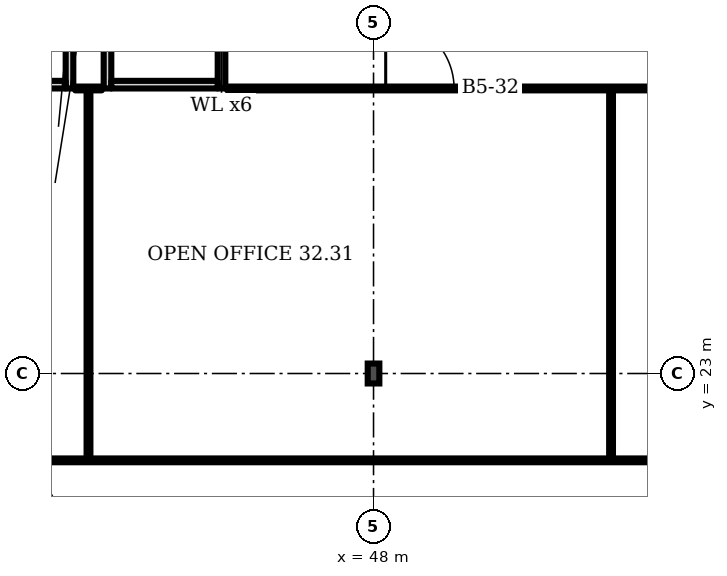
"""IFC4 building model, lengths in metres.
Left out: names, types, materials, properties, quantities, classifications, styles, units other than length and angle.
Written with IfcOpenShell. Run it as: python <this file> out.ifc"""

import sys

from ifc_helpers import new_model, si_unit, direction, frame, frame_2d, origin, origin_2d, place, context, subcontext, project, spatial, rectangle, i_section, extrude, element, fill, save


model = new_model("IFC4")
c1 = context("Model", 3, precision=1e-05, world=origin(), true_north=direction((0.0, 1.0)))
c2 = subcontext(c1, "Body", "Model", "MODEL_VIEW")
j1 = project(units=[si_unit("LENGTHUNIT", "METRE"), si_unit("PLANEANGLEUNIT", "RADIAN")], contexts=[c1])
p1 = place(None, origin())
s1 = spatial("IfcSite", under=j1, at=p1, CompositionType="ELEMENT")
p2 = place(p1, origin())
s2 = spatial("IfcBuilding", under=s1, at=p2, CompositionType="ELEMENT")
p3 = place(p2, frame((0.0, 0.0, 136.3)))
s3 = spatial("IfcBuildingStorey", under=s2, at=p3, CompositionType="ELEMENT", Elevation=136.3)
p4 = place(p3, frame((48.0, 23.0, 0.0), z_axis=(0.0, 0.0, 1.0), x_axis=(1.0, 0.0, 0.0)))
e1 = element("IfcColumn", 1, at=p4, inside=s3, PredefinedType="COLUMN", context=c2, shape_type="SweptSolid", body=[
    extrude(i_section(OverallWidth=0.306, OverallDepth=0.524, WebThickness=0.021, FlangeThickness=0.04, FilletRadius=0.027, at=origin_2d()), origin(), (0.0, 0.0, 1.0), 3.6),
])
p5 = place(p3, frame((40.0, 30.5, 0.0), z_axis=(0.0, 0.0, 1.0), x_axis=(0.0, 1.0, 0.0)))
e2 = element("IfcWall", 2, at=p5, inside=s3, PredefinedType="PARTITIONING", context=c2, shape_type="SweptSolid", body=[
    extrude(rectangle(XDim=3.5, YDim=0.2, at=frame_2d((1.75, 0.0))), origin(), (0.0, 0.0, 1.0), 3.2),
])
p6 = place(p3, frame((37.1, 30.6, 0.0), z_axis=(0.0, 0.0, 1.0), x_axis=(1.0, 0.0, 0.0)))
e3 = element("IfcWall", 3, at=p6, inside=s3, PredefinedType="PARTITIONING", context=c2, shape_type="SweptSolid", body=[
    extrude(rectangle(XDim=2.8, YDim=0.2, at=frame_2d((1.4, 0.0))), origin(), (0.0, 0.0, 1.0), 3.2),
])
p7 = place(p3, frame((41.0, 30.5, 0.0), z_axis=(0.0, 0.0, 1.0), x_axis=(0.0, 1.0, 0.0)))
e4 = element("IfcWall", 4, at=p7, inside=s3, PredefinedType="PARTITIONING", context=c2, shape_type="SweptSolid", body=[
    extrude(rectangle(XDim=3.5, YDim=0.2, at=frame_2d((1.75, 0.0))), origin(), (0.0, 0.0, 1.0), 3.2),
])
p8 = place(p3, frame((44.0, 30.5, 0.0), z_axis=(0.0, 0.0, 1.0), x_axis=(0.0, 1.0, 0.0)))
e5 = element("IfcWall", 5, at=p8, inside=s3, PredefinedType="PARTITIONING", context=c2, shape_type="SweptSolid", body=[
    extrude(rectangle(XDim=3.5, YDim=0.2, at=frame_2d((1.75, 0.0))), origin(), (0.0, 0.0, 1.0), 3.2),
])
p9 = place(p8, frame((1.2, 0.0, 0.0)))
e6 = element("IfcOpeningElement", 6, at=p9, cuts=e5, PredefinedType="OPENING", context=c2, shape_type="SweptSolid", body=[
    extrude(rectangle(XDim=1.1, YDim=2.1, at=frame_2d((0.55, 1.05))), frame((0.0, 0.11, 0.0), z_axis=(0.0, -1.0, 0.0), x_axis=(1.0, 0.0, 0.0)), (0.0, 0.0, 1.0), 0.22),
])
p10 = place(p3, frame((41.1, 30.6, 0.0), z_axis=(0.0, 0.0, 1.0), x_axis=(1.0, 0.0, 0.0)))
e7 = element("IfcWall", 7, at=p10, inside=s3, PredefinedType="PARTITIONING", context=c2, shape_type="SweptSolid", body=[
    extrude(rectangle(XDim=2.8, YDim=0.2, at=frame_2d((1.4, 0.0))), origin(), (0.0, 0.0, 1.0), 3.2),
])
p11 = place(p3, frame((18.505, 20.715, 0.0), z_axis=(0.0, 0.0, 1.0), x_axis=(1.0, 0.0, 0.0)))
e8 = element("IfcWall", 8, at=p11, inside=s3, PredefinedType="PARTITIONING", context=c2, shape_type="SweptSolid", body=[
    extrude(rectangle(XDim=49.385, YDim=0.1, at=frame_2d((24.692, 0.0))), origin(), (0.0, 0.0, 1.0), 3.2),
])
p12 = place(p11, frame((1.025, 0.0, 0.0)))
e9 = element("IfcOpeningElement", 9, at=p12, cuts=e8, PredefinedType="OPENING", context=c2, shape_type="SweptSolid", body=[
    extrude(rectangle(XDim=1.0, YDim=2.1, at=frame_2d((0.5, 1.05))), frame((0.0, 0.06, 0.0), z_axis=(0.0, -1.0, 0.0), x_axis=(1.0, 0.0, 0.0)), (0.0, 0.0, 1.0), 0.12),
])
for number, where, z_axis, x_axis in (
    (10, (40.5, 20.715, 0.0), (0.0, 0.0, 1.0), (0.0, 1.0, 0.0)),
    (11, (54.25, 20.715, 0.0), (0.0, 0.0, 1.0), (0.0, 1.0, 0.0)),
):
    element("IfcWall", number, at=place(p3, frame(where, z_axis=z_axis, x_axis=x_axis)), inside=s3, PredefinedType="PARTITIONING", context=c2, shape_type="SweptSolid", body=[
        extrude(rectangle(XDim=9.785, YDim=0.1, at=frame_2d((4.893, 0.0))), origin(), (0.0, 0.0, 1.0), 3.2),
    ])
p13 = place(p3, frame((40.15, 30.5, 0.0), z_axis=(0.0, 0.0, 1.0), x_axis=(1.0, 0.0, 0.0)))
e12 = element("IfcWall", 12, at=p13, inside=s3, PredefinedType="PARTITIONING", context=c2, shape_type="SweptSolid", body=[
    extrude(rectangle(XDim=0.7, YDim=0.1, at=frame_2d((0.35, 0.0))), origin(), (0.0, 0.0, 1.0), 3.2),
])
p14 = place(p3, frame((44.15, 30.5, 0.0), z_axis=(0.0, 0.0, 1.0), x_axis=(1.0, 0.0, 0.0)))
e13 = element("IfcWall", 13, at=p14, inside=s3, PredefinedType="PARTITIONING", context=c2, shape_type="SweptSolid", body=[
    extrude(rectangle(XDim=20.85, YDim=0.1, at=frame_2d((10.425, 0.0))), origin(), (0.0, 0.0, 1.0), 3.2),
])
p15 = place(p14, frame((4.17, 0.0, 0.0)))
e14 = element("IfcOpeningElement", 14, at=p15, cuts=e13, PredefinedType="OPENING", context=c2, shape_type="SweptSolid", body=[
    extrude(rectangle(XDim=1.8, YDim=2.1, at=frame_2d((0.9, 1.05))), frame((0.0, 0.06, 0.0), z_axis=(0.0, -1.0, 0.0), x_axis=(1.0, 0.0, 0.0)), (0.0, 0.0, 1.0), 0.12),
])
p16 = place(p14, frame((16.72, 0.0, 0.0)))
e15 = element("IfcOpeningElement", 15, at=p16, cuts=e13, PredefinedType="OPENING", context=c2, shape_type="SweptSolid", body=[
    extrude(rectangle(XDim=1.0, YDim=2.1, at=frame_2d((0.5, 1.05))), frame((0.0, 0.06, 0.0), z_axis=(0.0, -1.0, 0.0), x_axis=(1.0, 0.0, 0.0)), (0.0, 0.0, 1.0), 0.12),
])
p17 = place(p15, origin())
e16 = element("IfcDoor", 16, at=p17, inside=s3, OperationType="DOUBLE_DOOR_SINGLE_SWING", PredefinedType="DOOR", context=c2, shape_type="SweptSolid", body=[
    extrude(rectangle(XDim=1.8, YDim=2.1, at=frame_2d((0.9, 1.05))), frame((0.0, 0.025, 0.0), z_axis=(0.0, -1.0, 0.0), x_axis=(1.0, 0.0, 0.0)), (0.0, 0.0, 1.0), 0.05),
])
fill(e14, e16)
save(model, sys.argv[1])
